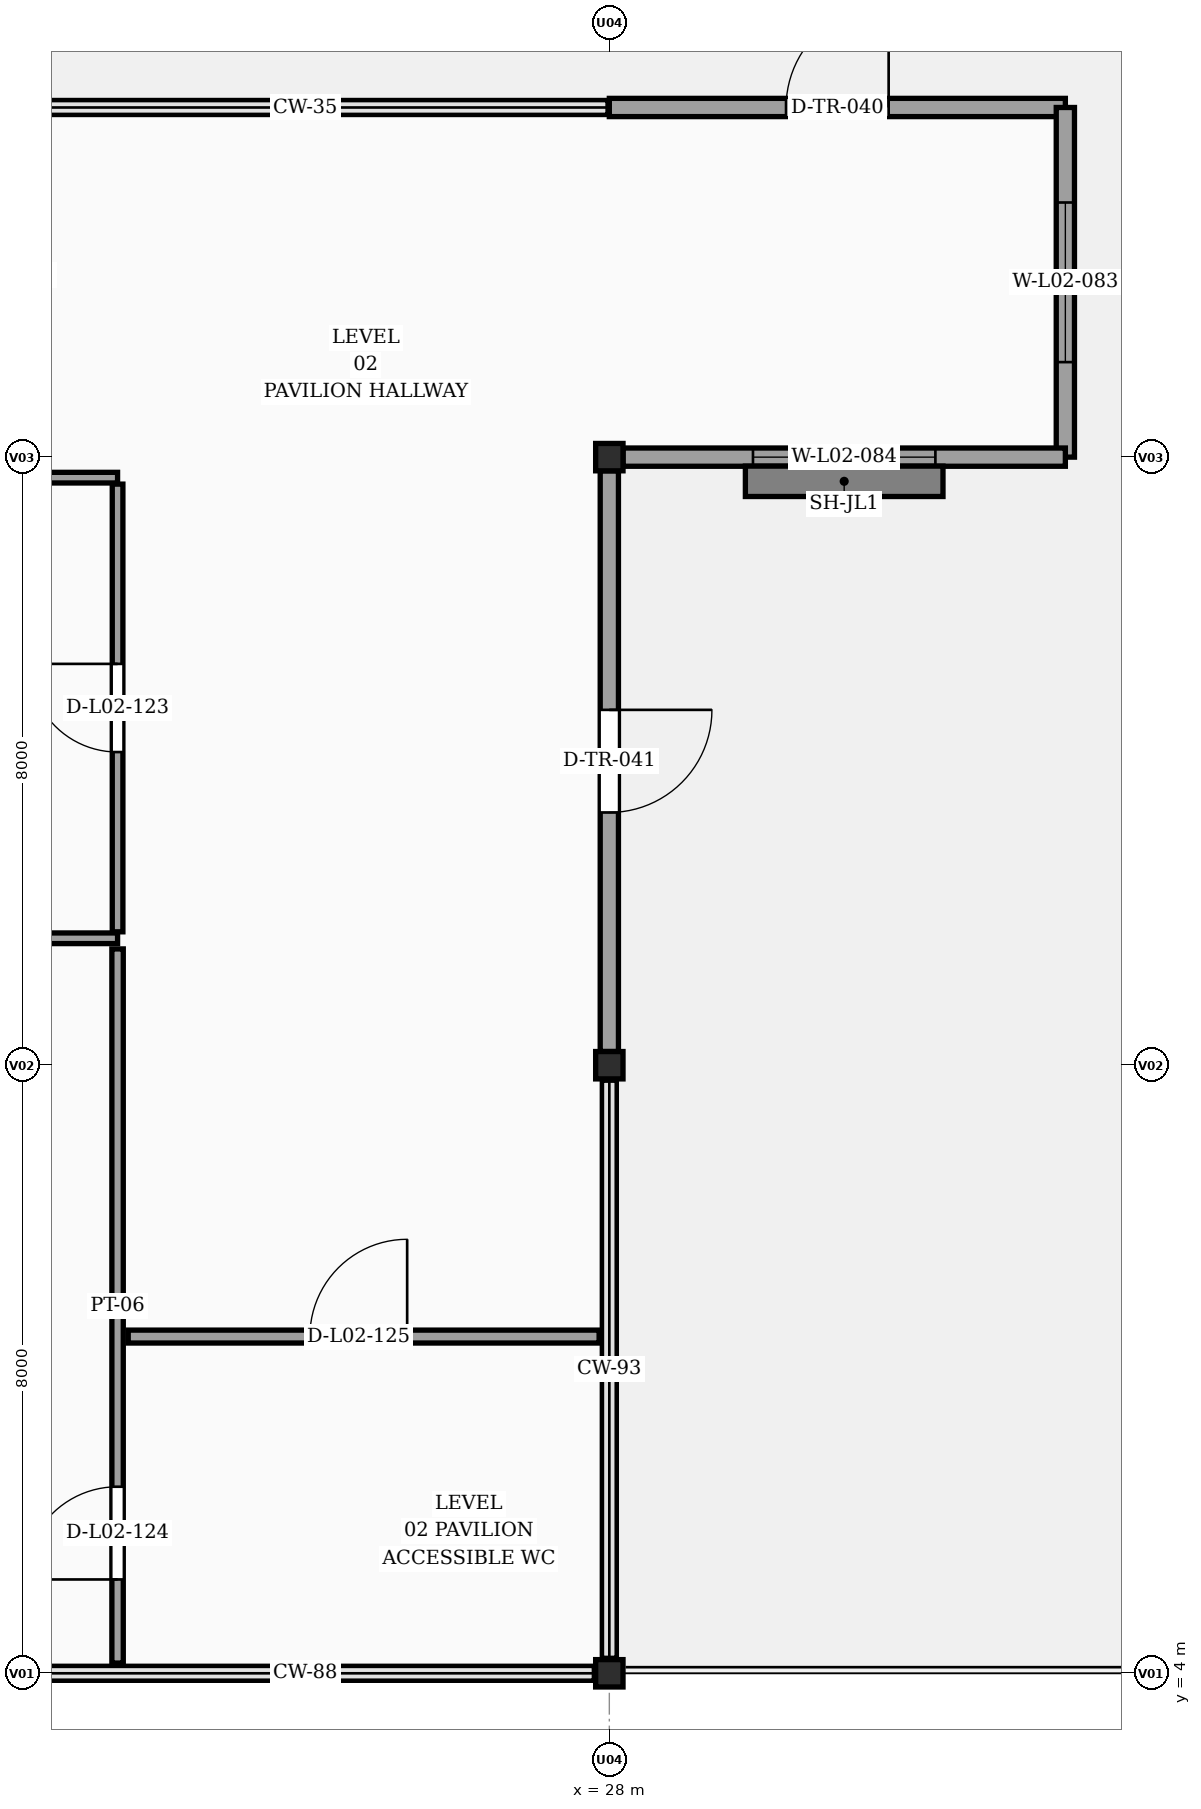
"""IFC4 building model, lengths in metres.
Left out: names, types, materials, properties, quantities, classifications, styles, units other than length and angle.
Written with IfcOpenShell. Run it as: python <this file> out.ifc"""

import sys

from ifc_helpers import new_model, si_unit, direction, frame, frame_2d, origin, origin_2d, place, context, subcontext, project, spatial, rectangle, extrude, element, fill, save


model = new_model("IFC4")
c1 = context("Model", 3, precision=1e-05, world=origin(), true_north=direction((0.0, 1.0)))
c2 = subcontext(c1, "Body", "Model", "MODEL_VIEW")
j1 = project(units=[si_unit("LENGTHUNIT", "METRE"), si_unit("PLANEANGLEUNIT", "RADIAN")], contexts=[c1])
p1 = place(None, origin())
s1 = spatial("IfcSite", under=j1, at=p1, CompositionType="ELEMENT")
p2 = place(p1, origin())
s2 = spatial("IfcBuilding", under=s1, at=p2, CompositionType="ELEMENT")
p3 = place(p2, frame((0.0, 0.0, 8.4)))
s3 = spatial("IfcBuildingStorey", under=s2, at=p3, CompositionType="ELEMENT", Elevation=8.4)
p4 = place(p3, frame((28.0, 4.0, 0.0), z_axis=(0.0, 0.0, 1.0), x_axis=(1.0, 0.0, 0.0)))
e1 = element("IfcColumn", 1, at=p4, inside=s3, PredefinedType="COLUMN", context=c2, shape_type="SweptSolid", body=[
    extrude(rectangle(XDim=0.36, YDim=0.36, at=origin_2d()), origin(), (0.0, 0.0, 1.0), 5.89),
])
p5 = place(p3, frame((28.0, 12.0, 0.0), z_axis=(0.0, 0.0, 1.0), x_axis=(1.0, 0.0, 0.0)))
e2 = element("IfcColumn", 2, at=p5, inside=s3, PredefinedType="COLUMN", context=c2, shape_type="SweptSolid", body=[
    extrude(rectangle(XDim=0.36, YDim=0.36, at=origin_2d()), origin(), (0.0, 0.0, 1.0), 3.961),
])
p6 = place(p3, frame((28.0, 20.0, 0.0), z_axis=(0.0, 0.0, 1.0), x_axis=(1.0, 0.0, 0.0)))
e3 = element("IfcColumn", 3, at=p6, inside=s3, PredefinedType="COLUMN", context=c2, shape_type="SweptSolid", body=[
    extrude(rectangle(XDim=0.36, YDim=0.36, at=origin_2d()), origin(), (0.0, 0.0, 1.0), 5.796),
])
p7 = place(p3, frame((27.82, 4.0, 0.0), z_axis=(0.0, 0.0, 1.0), x_axis=(-1.0, 0.0, 0.0)))
e4 = element("IfcWall", 4, at=p7, inside=s3, PredefinedType="SOLIDWALL", context=c2, shape_type="SweptSolid", body=[
    extrude(rectangle(XDim=7.64, YDim=0.185, at=frame_2d((3.82, 0.0))), origin(), (0.0, 0.0, 1.0), 0.95),
])
p8 = place(p3, frame((20.0, 24.6, 0.0), z_axis=(0.0, 0.0, 1.0), x_axis=(1.0, 0.0, 0.0)))
e5 = element("IfcWall", 5, at=p8, inside=s3, PredefinedType="SOLIDWALL", context=c2, shape_type="SweptSolid", body=[
    extrude(rectangle(XDim=8.0, YDim=0.185, at=frame_2d((4.0, 0.0))), origin(), (0.0, 0.0, 1.0), 0.95),
])
p9 = place(p3, frame((28.0, 24.6, 0.0), z_axis=(0.0, 0.0, 1.0), x_axis=(1.0, 0.0, 0.0)))
e6 = element("IfcWall", 6, at=p9, inside=s3, PredefinedType="SOLIDWALL", context=c2, shape_type="SweptSolid", body=[
    extrude(rectangle(XDim=6.0, YDim=0.24, at=frame_2d((3.0, 0.0))), origin(), (0.0, 0.0, 1.0), 3.65),
])
p10 = place(p9, frame((2.325, 0.0, 0.0)))
e7 = element("IfcOpeningElement", 7, at=p10, cuts=e6, PredefinedType="OPENING", context=c2, shape_type="SweptSolid", body=[
    extrude(rectangle(XDim=1.35, YDim=2.15, at=frame_2d((0.675, 1.075))), frame((0.0, 0.13, 0.0), z_axis=(0.0, -1.0, 0.0), x_axis=(1.0, 0.0, 0.0)), (0.0, 0.0, 1.0), 0.26),
])
p11 = place(p3, frame((34.0, 24.6, 0.0), z_axis=(0.0, 0.0, 1.0), x_axis=(0.0, -1.0, 0.0)))
e8 = element("IfcWall", 8, at=p11, inside=s3, PredefinedType="SOLIDWALL", context=c2, shape_type="SweptSolid", body=[
    extrude(rectangle(XDim=4.6, YDim=0.24, at=frame_2d((2.3, 0.0))), origin(), (0.0, 0.0, 1.0), 3.65),
])
p12 = place(p11, frame((1.25, 0.0, 0.95)))
e9 = element("IfcOpeningElement", 9, at=p12, cuts=e8, PredefinedType="OPENING", context=c2, shape_type="SweptSolid", body=[
    extrude(rectangle(XDim=2.1, YDim=1.35, at=frame_2d((1.05, 0.675))), frame((0.0, 0.13, 0.0), z_axis=(0.0, -1.0, 0.0), x_axis=(1.0, 0.0, 0.0)), (0.0, 0.0, 1.0), 0.26),
])
p13 = place(p3, frame((34.0, 20.0, 0.0), z_axis=(0.0, 0.0, 1.0), x_axis=(-1.0, 0.0, 0.0)))
e10 = element("IfcWall", 10, at=p13, inside=s3, PredefinedType="SOLIDWALL", context=c2, shape_type="SweptSolid", body=[
    extrude(rectangle(XDim=5.82, YDim=0.24, at=frame_2d((2.91, 0.0))), origin(), (0.0, 0.0, 1.0), 3.65),
])
p14 = place(p13, frame((1.71, 0.0, 0.95)))
e11 = element("IfcOpeningElement", 11, at=p14, cuts=e10, PredefinedType="OPENING", context=c2, shape_type="SweptSolid", body=[
    extrude(rectangle(XDim=2.4, YDim=1.35, at=frame_2d((1.2, 0.675))), frame((0.0, 0.13, 0.0), z_axis=(0.0, -1.0, 0.0), x_axis=(1.0, 0.0, 0.0)), (0.0, 0.0, 1.0), 0.26),
])
p15 = place(p3, frame((28.0, 19.82, 0.0), z_axis=(0.0, 0.0, 1.0), x_axis=(0.0, -1.0, 0.0)))
e12 = element("IfcWall", 12, at=p15, inside=s3, PredefinedType="SOLIDWALL", context=c2, shape_type="SweptSolid", body=[
    extrude(rectangle(XDim=7.64, YDim=0.24, at=frame_2d((3.82, 0.0))), origin(), (0.0, 0.0, 1.0), 3.412),
])
p16 = place(p15, frame((3.145, 0.0, 0.0)))
e13 = element("IfcOpeningElement", 13, at=p16, cuts=e12, PredefinedType="OPENING", context=c2, shape_type="SweptSolid", body=[
    extrude(rectangle(XDim=1.35, YDim=2.15, at=frame_2d((0.675, 1.075))), frame((0.0, 0.13, 0.0), z_axis=(0.0, -1.0, 0.0), x_axis=(1.0, 0.0, 0.0)), (0.0, 0.0, 1.0), 0.26),
])
p17 = place(p3, frame((28.0, 11.82, 0.0), z_axis=(0.0, 0.0, 1.0), x_axis=(0.0, -1.0, 0.0)))
e14 = element("IfcWall", 14, at=p17, inside=s3, PredefinedType="SOLIDWALL", context=c2, shape_type="SweptSolid", body=[
    extrude(rectangle(XDim=7.64, YDim=0.185, at=frame_2d((3.82, 0.0))), origin(), (0.0, 0.0, 1.0), 0.95),
])
p18 = place(p3, frame((12.0, 13.67, 0.0), z_axis=(0.0, 0.0, 1.0), x_axis=(1.0, 0.0, 0.0)))
e15 = element("IfcWall", 15, at=p18, inside=s3, PredefinedType="PARTITIONING", context=c2, shape_type="SweptSolid", body=[
    extrude(rectangle(XDim=9.53, YDim=0.14, at=frame_2d((4.765, 0.0))), origin(), (0.0, 0.0, 1.0), 3.65),
])
p19 = place(p3, frame((19.84, 19.73, 0.0), z_axis=(0.0, 0.0, 1.0), x_axis=(1.0, 0.0, 0.0)))
e16 = element("IfcWall", 16, at=p19, inside=s3, PredefinedType="PARTITIONING", context=c2, shape_type="SweptSolid", body=[
    extrude(rectangle(XDim=1.69, YDim=0.14, at=frame_2d((0.845, 0.0))), origin(), (0.0, 0.0, 1.0), 3.65),
])
p20 = place(p3, frame((21.53, 13.755, 0.0), z_axis=(0.0, 0.0, 1.0), x_axis=(0.0, 1.0, 0.0)))
e17 = element("IfcWall", 17, at=p20, inside=s3, PredefinedType="PARTITIONING", context=c2, shape_type="SweptSolid", body=[
    extrude(rectangle(XDim=5.89, YDim=0.14, at=frame_2d((2.945, 0.0))), origin(), (0.0, 0.0, 1.0), 3.65),
])
p21 = place(p20, frame((2.365, 0.0, 0.0)))
e18 = element("IfcOpeningElement", 18, at=p21, cuts=e17, PredefinedType="OPENING", context=c2, shape_type="SweptSolid", body=[
    extrude(rectangle(XDim=1.16, YDim=2.15, at=frame_2d((0.58, 1.075))), frame((0.0, 0.08, 0.0), z_axis=(0.0, -1.0, 0.0), x_axis=(1.0, 0.0, 0.0)), (0.0, 0.0, 1.0), 0.16),
])
p22 = place(p3, frame((21.53, 4.135, 0.0), z_axis=(0.0, 0.0, 1.0), x_axis=(0.0, 1.0, 0.0)))
e19 = element("IfcWall", 19, at=p22, inside=s3, PredefinedType="PARTITIONING", context=c2, shape_type="SweptSolid", body=[
    extrude(rectangle(XDim=9.396, YDim=0.15, at=frame_2d((4.698, 0.0))), origin(), (0.0, 0.0, 1.0), 3.65),
])
p23 = place(p22, frame((1.1, 0.0, 0.0)))
e20 = element("IfcOpeningElement", 20, at=p23, cuts=e19, PredefinedType="OPENING", context=c2, shape_type="SweptSolid", body=[
    extrude(rectangle(XDim=1.22, YDim=2.15, at=frame_2d((0.61, 1.075))), frame((0.0, 0.085, 0.0), z_axis=(0.0, -1.0, 0.0), x_axis=(1.0, 0.0, 0.0)), (0.0, 0.0, 1.0), 0.17),
])
p24 = place(p3, frame((21.67, 8.43, 0.0), z_axis=(0.0, 0.0, 1.0), x_axis=(1.0, 0.0, 0.0)))
e21 = element("IfcWall", 21, at=p24, inside=s3, PredefinedType="PARTITIONING", context=c2, shape_type="SweptSolid", body=[
    extrude(rectangle(XDim=6.196, YDim=0.17, at=frame_2d((3.098, 0.0))), origin(), (0.0, 0.0, 1.0), 3.65),
])
p25 = place(p24, frame((2.39, 0.0, 0.0)))
e22 = element("IfcOpeningElement", 22, at=p25, cuts=e21, PredefinedType="OPENING", context=c2, shape_type="SweptSolid", body=[
    extrude(rectangle(XDim=1.28, YDim=2.15, at=frame_2d((0.64, 1.075))), frame((0.0, 0.095, 0.0), z_axis=(0.0, -1.0, 0.0), x_axis=(1.0, 0.0, 0.0)), (0.0, 0.0, 1.0), 0.19),
])
p26 = place(p10, origin())
e23 = element("IfcDoor", 23, at=p26, inside=s3, OperationType="SINGLE_SWING_RIGHT", PredefinedType="DOOR", context=c2, shape_type="SweptSolid", body=[
    extrude(rectangle(XDim=1.35, YDim=2.15, at=frame_2d((0.675, 1.075))), frame((0.0, 0.025, 0.0), z_axis=(0.0, -1.0, 0.0), x_axis=(1.0, 0.0, 0.0)), (0.0, 0.0, 1.0), 0.05),
])
fill(e7, e23)
p27 = place(p12, origin())
e24 = element("IfcWindow", 24, at=p27, inside=s3, PartitioningType="DOUBLE_PANEL_VERTICAL", PredefinedType="WINDOW", context=c2, shape_type="SweptSolid", body=[
    extrude(rectangle(XDim=2.1, YDim=1.35, at=frame_2d((1.05, 0.675))), frame((0.0, 0.03, 0.0), z_axis=(0.0, -1.0, 0.0), x_axis=(1.0, 0.0, 0.0)), (0.0, 0.0, 1.0), 0.06),
])
fill(e9, e24)
p28 = place(p14, origin())
e25 = element("IfcWindow", 25, at=p28, inside=s3, PartitioningType="DOUBLE_PANEL_VERTICAL", PredefinedType="WINDOW", context=c2, shape_type="SweptSolid", body=[
    extrude(rectangle(XDim=2.4, YDim=1.35, at=frame_2d((1.2, 0.675))), frame((0.0, 0.03, 0.0), z_axis=(0.0, -1.0, 0.0), x_axis=(1.0, 0.0, 0.0)), (0.0, 0.0, 1.0), 0.06),
])
fill(e11, e25)
p29 = place(p16, origin())
e26 = element("IfcDoor", 26, at=p29, inside=s3, OperationType="SINGLE_SWING_LEFT", PredefinedType="DOOR", context=c2, shape_type="SweptSolid", body=[
    extrude(rectangle(XDim=1.35, YDim=2.15, at=frame_2d((0.675, 1.075))), frame((0.0, 0.025, 0.0), z_axis=(0.0, -1.0, 0.0), x_axis=(1.0, 0.0, 0.0)), (0.0, 0.0, 1.0), 0.05),
])
fill(e13, e26)
p30 = place(p21, origin())
e27 = element("IfcDoor", 27, at=p30, inside=s3, OperationType="SINGLE_SWING_RIGHT", PredefinedType="DOOR", context=c2, shape_type="SweptSolid", body=[
    extrude(rectangle(XDim=1.16, YDim=2.15, at=frame_2d((0.58, 1.075))), frame((0.0, 0.025, 0.0), z_axis=(0.0, -1.0, 0.0), x_axis=(1.0, 0.0, 0.0)), (0.0, 0.0, 1.0), 0.05),
])
fill(e18, e27)
p31 = place(p23, origin())
e28 = element("IfcDoor", 28, at=p31, inside=s3, OperationType="SINGLE_SWING_LEFT", PredefinedType="DOOR", context=c2, shape_type="SweptSolid", body=[
    extrude(rectangle(XDim=1.22, YDim=2.15, at=frame_2d((0.61, 1.075))), frame((0.0, 0.025, 0.0), z_axis=(0.0, -1.0, 0.0), x_axis=(1.0, 0.0, 0.0)), (0.0, 0.0, 1.0), 0.05),
])
fill(e20, e28)
p32 = place(p25, origin())
e29 = element("IfcDoor", 29, at=p32, inside=s3, OperationType="SINGLE_SWING_RIGHT", PredefinedType="DOOR", context=c2, shape_type="SweptSolid", body=[
    extrude(rectangle(XDim=1.28, YDim=2.15, at=frame_2d((0.64, 1.075))), frame((0.0, 0.025, 0.0), z_axis=(0.0, -1.0, 0.0), x_axis=(1.0, 0.0, 0.0)), (0.0, 0.0, 1.0), 0.05),
])
fill(e22, e29)
save(model, sys.argv[1])
